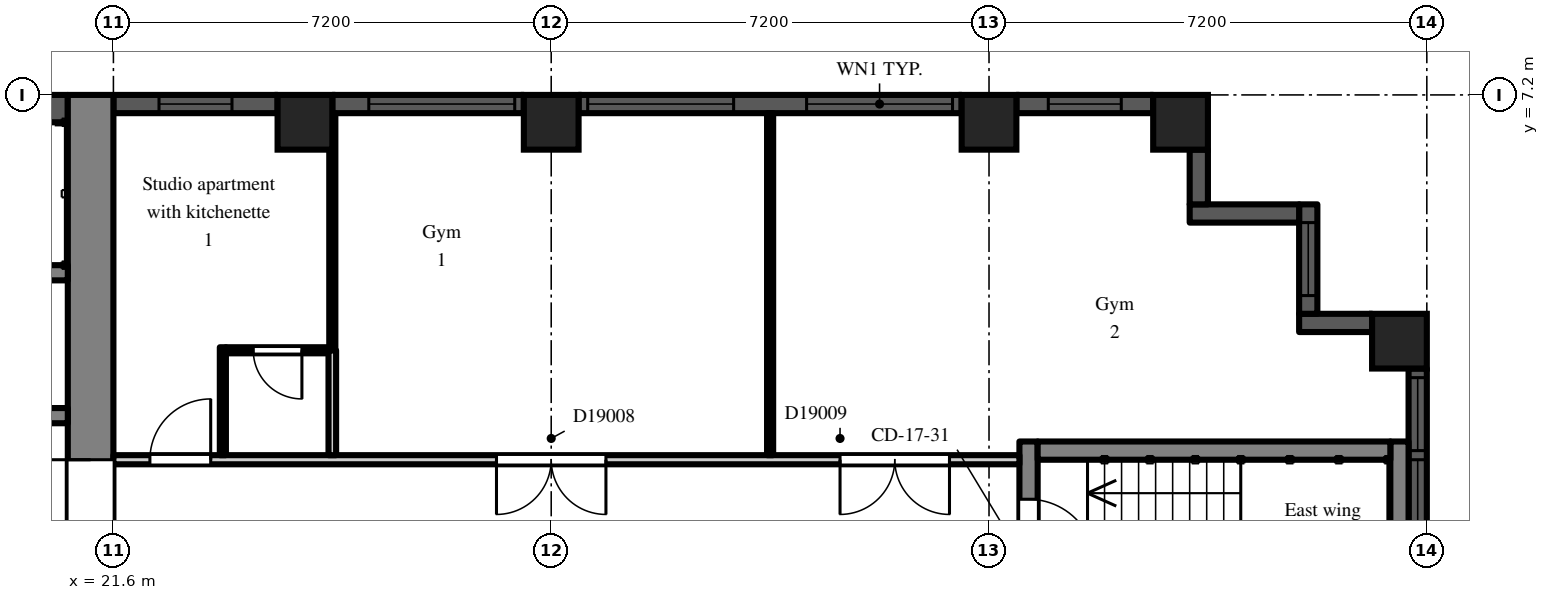
"""IFC4 building model, lengths in metres.
Left out: names, types, materials, properties, quantities, classifications, styles, units other than length and angle.
Written with IfcOpenShell. Run it as: python <this file> out.ifc"""

import sys

from ifc_helpers import new_model, si_unit, direction, frame, frame_2d, origin, origin_2d, place, context, subcontext, project, spatial, rectangle, extrude, element, fill, save


model = new_model("IFC4")
c1 = context("Model", 3, precision=1e-05, world=origin(), true_north=direction((0.0, 1.0)))
c2 = subcontext(c1, "Body", "Model", "MODEL_VIEW")
j1 = project(units=[si_unit("LENGTHUNIT", "METRE"), si_unit("PLANEANGLEUNIT", "RADIAN")], contexts=[c1])
p1 = place(None, origin())
s1 = spatial("IfcSite", under=j1, at=p1, CompositionType="ELEMENT")
p2 = place(p1, origin())
s2 = spatial("IfcBuilding", under=s1, at=p2, CompositionType="ELEMENT")
p3 = place(p2, frame((0.0, 0.0, 129.3)))
s3 = spatial("IfcBuildingStorey", under=s2, at=p3, CompositionType="ELEMENT", Elevation=129.3)
for number, where, z_axis, x_axis in (
    (1, (24.75, 6.75, 0.0), (0.0, 0.0, 1.0), (1.0, 0.0, 0.0)),
    (2, (28.8, 6.75, 0.0), (0.0, 0.0, 1.0), (1.0, 0.0, 0.0)),
    (3, (36.0, 6.75, 0.0), (0.0, 0.0, 1.0), (1.0, 0.0, 0.0)),
    (4, (39.15, 6.75, 0.0), (0.0, 0.0, 1.0), (1.0, 0.0, 0.0)),
    (5, (42.75, 3.15, 0.0), (0.0, 0.0, 1.0), (1.0, 0.0, 0.0)),
):
    element("IfcColumn", number, at=place(p3, frame(where, z_axis=z_axis, x_axis=x_axis)), inside=s3, PredefinedType="COLUMN", context=c2, shape_type="SweptSolid", body=[
        extrude(rectangle(XDim=0.9, YDim=0.9, at=origin_2d()), origin(), (0.0, 0.0, 1.0), 3.0),
    ])
p4 = place(p3, frame((43.05, -2.7, 0.0), z_axis=(0.0, 0.0, 1.0), x_axis=(0.0, 1.0, 0.0)))
e6 = element("IfcWall", 6, at=p4, inside=s3, PredefinedType="SOLIDWALL", context=c2, shape_type="SweptSolid", body=[
    extrude(rectangle(XDim=5.4, YDim=0.3, at=frame_2d((2.7, 0.0))), origin(), (0.0, 0.0, 1.0), 2.2),
])
p5 = place(p4, frame((1.5, 0.0, 0.2)))
e7 = element("IfcOpeningElement", 7, at=p5, cuts=e6, PredefinedType="OPENING", context=c2, shape_type="SweptSolid", body=[
    extrude(rectangle(XDim=2.4, YDim=1.85, at=frame_2d((1.2, 0.925))), frame((0.0, 0.16, 0.0), z_axis=(0.0, -1.0, 0.0), x_axis=(1.0, 0.0, 0.0)), (0.0, 0.0, 1.0), 0.32),
])
p6 = place(p4, frame((0.15, 0.0, 0.2)))
e8 = element("IfcOpeningElement", 8, at=p6, cuts=e6, PredefinedType="OPENING", context=c2, shape_type="SweptSolid", body=[
    extrude(rectangle(XDim=1.2, YDim=1.85, at=frame_2d((0.6, 0.925))), frame((0.0, 0.16, 0.0), z_axis=(0.0, -1.0, 0.0), x_axis=(1.0, 0.0, 0.0)), (0.0, 0.0, 1.0), 0.32),
])
p7 = place(p4, frame((4.05, 0.0, 0.2)))
e9 = element("IfcOpeningElement", 9, at=p7, cuts=e6, PredefinedType="OPENING", context=c2, shape_type="SweptSolid", body=[
    extrude(rectangle(XDim=1.2, YDim=1.85, at=frame_2d((0.6, 0.925))), frame((0.0, 0.16, 0.0), z_axis=(0.0, -1.0, 0.0), x_axis=(1.0, 0.0, 0.0)), (0.0, 0.0, 1.0), 0.32),
])
p8 = place(p3, frame((42.3, 3.45, 0.0), z_axis=(0.0, 0.0, 1.0), x_axis=(-1.0, 0.0, 0.0)))
e10 = element("IfcWall", 10, at=p8, inside=s3, PredefinedType="SOLIDWALL", context=c2, shape_type="SweptSolid", body=[
    extrude(rectangle(XDim=1.2, YDim=0.3, at=frame_2d((0.6, 0.0))), origin(), (0.0, 0.0, 1.0), 2.6),
])
p9 = place(p3, frame((41.25, 3.6, 0.0), z_axis=(0.0, 0.0, 1.0), x_axis=(0.0, 1.0, 0.0)))
e11 = element("IfcWall", 11, at=p9, inside=s3, PredefinedType="SOLIDWALL", context=c2, shape_type="SweptSolid", body=[
    extrude(rectangle(XDim=1.8, YDim=0.3, at=frame_2d((0.9, 0.0))), origin(), (0.0, 0.0, 1.0), 2.6),
])
p10 = place(p9, frame((0.3, 0.0, 0.2)))
e12 = element("IfcOpeningElement", 12, at=p10, cuts=e11, PredefinedType="OPENING", context=c2, shape_type="SweptSolid", body=[
    extrude(rectangle(XDim=1.2, YDim=1.85, at=frame_2d((0.6, 0.925))), frame((0.0, 0.16, 0.0), z_axis=(0.0, -1.0, 0.0), x_axis=(1.0, 0.0, 0.0)), (0.0, 0.0, 1.0), 0.32),
])
p11 = place(p3, frame((41.1, 5.25, 0.0), z_axis=(0.0, 0.0, 1.0), x_axis=(-1.0, 0.0, 0.0)))
e13 = element("IfcWall", 13, at=p11, inside=s3, PredefinedType="SOLIDWALL", context=c2, shape_type="SweptSolid", body=[
    extrude(rectangle(XDim=1.8, YDim=0.3, at=frame_2d((0.9, 0.0))), origin(), (0.0, 0.0, 1.0), 2.6),
])
p12 = place(p3, frame((39.45, 5.4, 0.0), z_axis=(0.0, 0.0, 1.0), x_axis=(0.0, 1.0, 0.0)))
e14 = element("IfcWall", 14, at=p12, inside=s3, PredefinedType="SOLIDWALL", context=c2, shape_type="SweptSolid", body=[
    extrude(rectangle(XDim=0.9, YDim=0.3, at=frame_2d((0.45, 0.0))), origin(), (0.0, 0.0, 1.0), 2.6),
])
p13 = place(p3, frame((38.7, 7.05, 0.0), z_axis=(0.0, 0.0, 1.0), x_axis=(-1.0, 0.0, 0.0)))
e15 = element("IfcWall", 15, at=p13, inside=s3, PredefinedType="SOLIDWALL", context=c2, shape_type="SweptSolid", body=[
    extrude(rectangle(XDim=2.25, YDim=0.3, at=frame_2d((1.125, 0.0))), origin(), (0.0, 0.0, 1.0), 2.2),
])
p14 = place(p13, frame((0.525, 0.0, 0.2)))
e16 = element("IfcOpeningElement", 16, at=p14, cuts=e15, PredefinedType="OPENING", context=c2, shape_type="SweptSolid", body=[
    extrude(rectangle(XDim=1.2, YDim=1.85, at=frame_2d((0.6, 0.925))), frame((0.0, 0.16, 0.0), z_axis=(0.0, -1.0, 0.0), x_axis=(1.0, 0.0, 0.0)), (0.0, 0.0, 1.0), 0.32),
])
p15 = place(p3, frame((35.55, 7.05, 0.0), z_axis=(0.0, 0.0, 1.0), x_axis=(-1.0, 0.0, 0.0)))
e17 = element("IfcWall", 17, at=p15, inside=s3, PredefinedType="SOLIDWALL", context=c2, shape_type="SweptSolid", body=[
    extrude(rectangle(XDim=6.3, YDim=0.3, at=frame_2d((3.15, 0.0))), origin(), (0.0, 0.0, 1.0), 2.2),
])
p16 = place(p15, frame((0.15, 0.0, 0.2)))
e18 = element("IfcOpeningElement", 18, at=p16, cuts=e17, PredefinedType="OPENING", context=c2, shape_type="SweptSolid", body=[
    extrude(rectangle(XDim=2.4, YDim=1.85, at=frame_2d((1.2, 0.925))), frame((0.0, 0.16, 0.0), z_axis=(0.0, -1.0, 0.0), x_axis=(1.0, 0.0, 0.0)), (0.0, 0.0, 1.0), 0.32),
])
p17 = place(p15, frame((3.75, 0.0, 0.2)))
e19 = element("IfcOpeningElement", 19, at=p17, cuts=e17, PredefinedType="OPENING", context=c2, shape_type="SweptSolid", body=[
    extrude(rectangle(XDim=2.4, YDim=1.85, at=frame_2d((1.2, 0.925))), frame((0.0, 0.16, 0.0), z_axis=(0.0, -1.0, 0.0), x_axis=(1.0, 0.0, 0.0)), (0.0, 0.0, 1.0), 0.32),
])
p18 = place(p3, frame((28.35, 7.05, 0.0), z_axis=(0.0, 0.0, 1.0), x_axis=(-1.0, 0.0, 0.0)))
e20 = element("IfcWall", 20, at=p18, inside=s3, PredefinedType="SOLIDWALL", context=c2, shape_type="SweptSolid", body=[
    extrude(rectangle(XDim=3.15, YDim=0.3, at=frame_2d((1.575, 0.0))), origin(), (0.0, 0.0, 1.0), 2.2),
])
p19 = place(p18, frame((0.15, 0.0, 0.2)))
e21 = element("IfcOpeningElement", 21, at=p19, cuts=e20, PredefinedType="OPENING", context=c2, shape_type="SweptSolid", body=[
    extrude(rectangle(XDim=2.4, YDim=1.85, at=frame_2d((1.2, 0.925))), frame((0.0, 0.16, 0.0), z_axis=(0.0, -1.0, 0.0), x_axis=(1.0, 0.0, 0.0)), (0.0, 0.0, 1.0), 0.32),
])
p20 = place(p3, frame((24.3, 7.05, 0.0), z_axis=(0.0, 0.0, 1.0), x_axis=(-1.0, 0.0, 0.0)))
e22 = element("IfcWall", 22, at=p20, inside=s3, PredefinedType="SOLIDWALL", context=c2, shape_type="SweptSolid", body=[
    extrude(rectangle(XDim=2.7, YDim=0.3, at=frame_2d((1.35, 0.0))), origin(), (0.0, 0.0, 1.0), 2.2),
])
p21 = place(p20, frame((0.75, 0.0, 0.2)))
e23 = element("IfcOpeningElement", 23, at=p21, cuts=e22, PredefinedType="OPENING", context=c2, shape_type="SweptSolid", body=[
    extrude(rectangle(XDim=1.2, YDim=1.85, at=frame_2d((0.6, 0.925))), frame((0.0, 0.16, 0.0), z_axis=(0.0, -1.0, 0.0), x_axis=(1.0, 0.0, 0.0)), (0.0, 0.0, 1.0), 0.32),
])
p22 = place(p3, frame((21.225, -7.2, 0.0), z_axis=(0.0, 0.0, 1.0), x_axis=(0.0, 1.0, 0.0)))
e24 = element("IfcWall", 24, at=p22, inside=s3, PredefinedType="SHEAR", context=c2, shape_type="SweptSolid", body=[
    extrude(rectangle(XDim=14.4, YDim=0.75, at=frame_2d((7.2, 0.0))), origin(), (0.0, 0.0, 1.0), 2.6),
])
p23 = place(p22, frame((6.0, 0.0, 0.0)))
e25 = element("IfcOpeningElement", 25, at=p23, cuts=e24, PredefinedType="OPENING", context=c2, shape_type="SweptSolid", body=[
    extrude(rectangle(XDim=2.4, YDim=2.2, at=frame_2d((1.2, 1.1))), frame((0.0, 0.385, 0.0), z_axis=(0.0, -1.0, 0.0), x_axis=(1.0, 0.0, 0.0)), (0.0, 0.0, 1.0), 0.77),
])
p24 = place(p3, frame((7.9, 6.975, 0.0), z_axis=(0.0, 0.0, 1.0), x_axis=(1.0, 0.0, 0.0)))
e26 = element("IfcWall", 26, at=p24, inside=s3, PredefinedType="SHEAR", context=c2, shape_type="SweptSolid", body=[
    extrude(rectangle(XDim=12.95, YDim=0.45, at=frame_2d((6.475, 0.0))), origin(), (0.0, 0.0, 1.0), 2.6),
])
p25 = place(p3, frame((7.9, 1.925, 0.0), z_axis=(0.0, 0.0, 1.0), x_axis=(1.0, 0.0, 0.0)))
e27 = element("IfcWall", 27, at=p25, inside=s3, PredefinedType="SHEAR", context=c2, shape_type="SweptSolid", body=[
    extrude(rectangle(XDim=12.95, YDim=0.25, at=frame_2d((6.475, 0.0))), origin(), (0.0, 0.0, 1.0), 2.6),
])
p26 = place(p25, frame((4.825, 0.0, 0.0)))
e28 = element("IfcOpeningElement", 28, at=p26, cuts=e27, PredefinedType="OPENING", context=c2, shape_type="SweptSolid", body=[
    extrude(rectangle(XDim=1.1, YDim=2.1, at=frame_2d((0.55, 1.05))), frame((0.0, 0.135, 0.0), z_axis=(0.0, -1.0, 0.0), x_axis=(1.0, 0.0, 0.0)), (0.0, 0.0, 1.0), 0.27),
])
p27 = place(p25, frame((7.025, 0.0, 0.0)))
e29 = element("IfcOpeningElement", 29, at=p27, cuts=e27, PredefinedType="OPENING", context=c2, shape_type="SweptSolid", body=[
    extrude(rectangle(XDim=1.1, YDim=2.1, at=frame_2d((0.55, 1.05))), frame((0.0, 0.135, 0.0), z_axis=(0.0, -1.0, 0.0), x_axis=(1.0, 0.0, 0.0)), (0.0, 0.0, 1.0), 0.27),
])
p28 = place(p25, frame((9.225, 0.0, 0.0)))
e30 = element("IfcOpeningElement", 30, at=p28, cuts=e27, PredefinedType="OPENING", context=c2, shape_type="SweptSolid", body=[
    extrude(rectangle(XDim=1.1, YDim=2.1, at=frame_2d((0.55, 1.05))), frame((0.0, 0.135, 0.0), z_axis=(0.0, -1.0, 0.0), x_axis=(1.0, 0.0, 0.0)), (0.0, 0.0, 1.0), 0.27),
])
p29 = place(p25, frame((0.525, 0.0, 0.0)))
e31 = element("IfcOpeningElement", 31, at=p29, cuts=e27, PredefinedType="OPENING", context=c2, shape_type="SweptSolid", body=[
    extrude(rectangle(XDim=0.9, YDim=2.1, at=frame_2d((0.45, 1.05))), frame((0.0, 0.135, 0.0), z_axis=(0.0, -1.0, 0.0), x_axis=(1.0, 0.0, 0.0)), (0.0, 0.0, 1.0), 0.27),
])
p30 = place(p25, frame((2.625, 0.0, 0.0)))
e32 = element("IfcOpeningElement", 32, at=p30, cuts=e27, PredefinedType="OPENING", context=c2, shape_type="SweptSolid", body=[
    extrude(rectangle(XDim=1.1, YDim=2.1, at=frame_2d((0.55, 1.05))), frame((0.0, 0.135, 0.0), z_axis=(0.0, -1.0, 0.0), x_axis=(1.0, 0.0, 0.0)), (0.0, 0.0, 1.0), 0.27),
])
p31 = place(p25, frame((11.525, 0.0, 0.0)))
e33 = element("IfcOpeningElement", 33, at=p31, cuts=e27, PredefinedType="OPENING", context=c2, shape_type="SweptSolid", body=[
    extrude(rectangle(XDim=0.9, YDim=2.1, at=frame_2d((0.45, 1.05))), frame((0.0, 0.135, 0.0), z_axis=(0.0, -1.0, 0.0), x_axis=(1.0, 0.0, 0.0)), (0.0, 0.0, 1.0), 0.27),
])
p32 = place(p3, frame((12.3, 4.275, 0.0), z_axis=(0.0, 0.0, 1.0), x_axis=(1.0, 0.0, 0.0)))
e34 = element("IfcWall", 34, at=p32, inside=s3, PredefinedType="SHEAR", context=c2, shape_type="SweptSolid", body=[
    extrude(rectangle(XDim=8.55, YDim=0.25, at=frame_2d((4.275, 0.0))), origin(), (0.0, 0.0, 1.0), 2.6),
])
p33 = place(p3, frame((36.65, -1.5, 0.0), z_axis=(0.0, 0.0, 1.0), x_axis=(0.0, 1.0, 0.0)))
e35 = element("IfcWall", 35, at=p33, inside=s3, PredefinedType="SHEAR", context=c2, shape_type="SweptSolid", body=[
    extrude(rectangle(XDim=3.0, YDim=0.3, at=frame_2d((1.5, 0.0))), origin(), (0.0, 0.0, 1.0), 2.6),
])
p34 = place(p33, frame((0.95, 0.0, 0.0)))
e36 = element("IfcOpeningElement", 36, at=p34, cuts=e35, PredefinedType="OPENING", context=c2, shape_type="SweptSolid", body=[
    extrude(rectangle(XDim=1.1, YDim=2.1, at=frame_2d((0.55, 1.05))), frame((0.0, 0.16, 0.0), z_axis=(0.0, -1.0, 0.0), x_axis=(1.0, 0.0, 0.0)), (0.0, 0.0, 1.0), 0.32),
])
p35 = place(p3, frame((42.75, -1.5, 0.0), z_axis=(0.0, 0.0, 1.0), x_axis=(0.0, 1.0, 0.0)))
e37 = element("IfcWall", 37, at=p35, inside=s3, PredefinedType="SHEAR", context=c2, shape_type="SweptSolid", body=[
    extrude(rectangle(XDim=3.0, YDim=0.3, at=frame_2d((1.5, 0.0))), origin(), (0.0, 0.0, 1.0), 2.6),
])
p36 = place(p3, frame((36.8, 1.35, 0.0), z_axis=(0.0, 0.0, 1.0), x_axis=(1.0, 0.0, 0.0)))
e38 = element("IfcWall", 38, at=p36, inside=s3, PredefinedType="SHEAR", context=c2, shape_type="SweptSolid", body=[
    extrude(rectangle(XDim=5.8, YDim=0.3, at=frame_2d((2.9, 0.0))), origin(), (0.0, 0.0, 1.0), 2.6),
])
p37 = place(p3, frame((21.6, 1.2, 0.0), z_axis=(0.0, 0.0, 1.0), x_axis=(1.0, 0.0, 0.0)))
e39 = element("IfcWall", 39, at=p37, inside=s3, PredefinedType="PARTITIONING", context=c2, shape_type="SweptSolid", body=[
    extrude(rectangle(XDim=14.9, YDim=0.15, at=frame_2d((7.45, 0.0))), origin(), (0.0, 0.0, 1.0), 2.6),
])
p38 = place(p37, frame((0.6, 0.0, 0.0)))
e40 = element("IfcOpeningElement", 40, at=p38, cuts=e39, PredefinedType="OPENING", context=c2, shape_type="SweptSolid", body=[
    extrude(rectangle(XDim=1.0, YDim=2.1, at=frame_2d((0.5, 1.05))), frame((0.0, 0.085, 0.0), z_axis=(0.0, -1.0, 0.0), x_axis=(1.0, 0.0, 0.0)), (0.0, 0.0, 1.0), 0.17),
])
p39 = place(p37, frame((6.3, 0.0, 0.0)))
e41 = element("IfcOpeningElement", 41, at=p39, cuts=e39, PredefinedType="OPENING", context=c2, shape_type="SweptSolid", body=[
    extrude(rectangle(XDim=1.8, YDim=2.1, at=frame_2d((0.9, 1.05))), frame((0.0, 0.085, 0.0), z_axis=(0.0, -1.0, 0.0), x_axis=(1.0, 0.0, 0.0)), (0.0, 0.0, 1.0), 0.17),
])
p40 = place(p37, frame((11.95, 0.0, 0.0)))
e42 = element("IfcOpeningElement", 42, at=p40, cuts=e39, PredefinedType="OPENING", context=c2, shape_type="SweptSolid", body=[
    extrude(rectangle(XDim=1.8, YDim=2.1, at=frame_2d((0.9, 1.05))), frame((0.0, 0.085, 0.0), z_axis=(0.0, -1.0, 0.0), x_axis=(1.0, 0.0, 0.0)), (0.0, 0.0, 1.0), 0.17),
])
p41 = place(p3, frame((23.4, 1.275, 0.0), z_axis=(0.0, 0.0, 1.0), x_axis=(0.0, 1.0, 0.0)))
e43 = element("IfcWall", 43, at=p41, inside=s3, PredefinedType="PARTITIONING", context=c2, shape_type="SweptSolid", body=[
    extrude(rectangle(XDim=1.775, YDim=0.1, at=frame_2d((0.888, 0.0))), origin(), (0.0, 0.0, 1.0), 2.6),
])
p42 = place(p3, frame((23.45, 3.0, 0.0), z_axis=(0.0, 0.0, 1.0), x_axis=(1.0, 0.0, 0.0)))
e44 = element("IfcWall", 44, at=p42, inside=s3, PredefinedType="PARTITIONING", context=c2, shape_type="SweptSolid", body=[
    extrude(rectangle(XDim=1.688, YDim=0.1, at=frame_2d((0.844, 0.0))), origin(), (0.0, 0.0, 1.0), 2.6),
])
p43 = place(p42, frame((0.45, 0.0, 0.0)))
e45 = element("IfcOpeningElement", 45, at=p43, cuts=e44, PredefinedType="OPENING", context=c2, shape_type="SweptSolid", body=[
    extrude(rectangle(XDim=0.8, YDim=2.1, at=frame_2d((0.4, 1.05))), frame((0.0, 0.06, 0.0), z_axis=(0.0, -1.0, 0.0), x_axis=(1.0, 0.0, 0.0)), (0.0, 0.0, 1.0), 0.12),
])
p44 = place(p3, frame((25.2, 1.275, 0.0), z_axis=(0.0, 0.0, 1.0), x_axis=(0.0, 1.0, 0.0)))
e46 = element("IfcWall", 46, at=p44, inside=s3, PredefinedType="PARTITIONING", context=c2, shape_type="SweptSolid", body=[
    extrude(rectangle(XDim=1.725, YDim=0.125, at=frame_2d((0.863, 0.0))), origin(), (0.0, 0.0, 1.0), 2.6),
])
p45 = place(p3, frame((25.2, 3.0, 0.0), z_axis=(0.0, 0.0, 1.0), x_axis=(0.0, 1.0, 0.0)))
e47 = element("IfcWall", 47, at=p45, inside=s3, PredefinedType="PARTITIONING", context=c2, shape_type="SweptSolid", body=[
    extrude(rectangle(XDim=3.9, YDim=0.1, at=frame_2d((1.95, 0.0))), origin(), (0.0, 0.0, 1.0), 2.6),
])
p46 = place(p3, frame((32.4, 1.275, 0.0), z_axis=(0.0, 0.0, 1.0), x_axis=(0.0, 1.0, 0.0)))
e48 = element("IfcWall", 48, at=p46, inside=s3, PredefinedType="PARTITIONING", context=c2, shape_type="SweptSolid", body=[
    extrude(rectangle(XDim=5.625, YDim=0.1, at=frame_2d((2.812, 0.0))), origin(), (0.0, 0.0, 1.0), 2.6),
])
p47 = place(p5, origin())
e49 = element("IfcWindow", 49, at=p47, inside=s3, PartitioningType="SINGLE_PANEL", PredefinedType="WINDOW", context=c2, shape_type="SweptSolid", body=[
    extrude(rectangle(XDim=2.4, YDim=1.85, at=frame_2d((1.2, 0.925))), frame((0.0, 0.03, 0.0), z_axis=(0.0, -1.0, 0.0), x_axis=(1.0, 0.0, 0.0)), (0.0, 0.0, 1.0), 0.06),
])
fill(e7, e49)
p48 = place(p7, origin())
e50 = element("IfcWindow", 50, at=p48, inside=s3, PartitioningType="SINGLE_PANEL", PredefinedType="WINDOW", context=c2, shape_type="SweptSolid", body=[
    extrude(rectangle(XDim=1.2, YDim=1.85, at=frame_2d((0.6, 0.925))), frame((0.0, 0.03, 0.0), z_axis=(0.0, -1.0, 0.0), x_axis=(1.0, 0.0, 0.0)), (0.0, 0.0, 1.0), 0.06),
])
fill(e9, e50)
p49 = place(p10, origin())
e51 = element("IfcWindow", 51, at=p49, inside=s3, PartitioningType="SINGLE_PANEL", PredefinedType="WINDOW", context=c2, shape_type="SweptSolid", body=[
    extrude(rectangle(XDim=1.2, YDim=1.85, at=frame_2d((0.6, 0.925))), frame((0.0, 0.03, 0.0), z_axis=(0.0, -1.0, 0.0), x_axis=(1.0, 0.0, 0.0)), (0.0, 0.0, 1.0), 0.06),
])
fill(e12, e51)
p50 = place(p14, origin())
e52 = element("IfcWindow", 52, at=p50, inside=s3, PartitioningType="SINGLE_PANEL", PredefinedType="WINDOW", context=c2, shape_type="SweptSolid", body=[
    extrude(rectangle(XDim=1.2, YDim=1.85, at=frame_2d((0.6, 0.925))), frame((0.0, 0.03, 0.0), z_axis=(0.0, -1.0, 0.0), x_axis=(1.0, 0.0, 0.0)), (0.0, 0.0, 1.0), 0.06),
])
fill(e16, e52)
p51 = place(p16, origin())
e53 = element("IfcWindow", 53, at=p51, inside=s3, PartitioningType="SINGLE_PANEL", PredefinedType="WINDOW", context=c2, shape_type="SweptSolid", body=[
    extrude(rectangle(XDim=2.4, YDim=1.85, at=frame_2d((1.2, 0.925))), frame((0.0, 0.03, 0.0), z_axis=(0.0, -1.0, 0.0), x_axis=(1.0, 0.0, 0.0)), (0.0, 0.0, 1.0), 0.06),
])
fill(e18, e53)
p52 = place(p17, origin())
e54 = element("IfcWindow", 54, at=p52, inside=s3, PartitioningType="SINGLE_PANEL", PredefinedType="WINDOW", context=c2, shape_type="SweptSolid", body=[
    extrude(rectangle(XDim=2.4, YDim=1.85, at=frame_2d((1.2, 0.925))), frame((0.0, 0.03, 0.0), z_axis=(0.0, -1.0, 0.0), x_axis=(1.0, 0.0, 0.0)), (0.0, 0.0, 1.0), 0.06),
])
fill(e19, e54)
p53 = place(p19, origin())
e55 = element("IfcWindow", 55, at=p53, inside=s3, PartitioningType="SINGLE_PANEL", PredefinedType="WINDOW", context=c2, shape_type="SweptSolid", body=[
    extrude(rectangle(XDim=2.4, YDim=1.85, at=frame_2d((1.2, 0.925))), frame((0.0, 0.03, 0.0), z_axis=(0.0, -1.0, 0.0), x_axis=(1.0, 0.0, 0.0)), (0.0, 0.0, 1.0), 0.06),
])
fill(e21, e55)
p54 = place(p21, origin())
e56 = element("IfcWindow", 56, at=p54, inside=s3, PartitioningType="SINGLE_PANEL", PredefinedType="WINDOW", context=c2, shape_type="SweptSolid", body=[
    extrude(rectangle(XDim=1.2, YDim=1.85, at=frame_2d((0.6, 0.925))), frame((0.0, 0.03, 0.0), z_axis=(0.0, -1.0, 0.0), x_axis=(1.0, 0.0, 0.0)), (0.0, 0.0, 1.0), 0.06),
])
fill(e23, e56)
p55 = place(p23, origin())
e57 = element("IfcDoor", 57, at=p55, inside=s3, OperationType="DOUBLE_DOOR_DOUBLE_SWING", PredefinedType="DOOR", context=c2, shape_type="SweptSolid", body=[
    extrude(rectangle(XDim=2.4, YDim=2.2, at=frame_2d((1.2, 1.1))), frame((0.0, 0.025, 0.0), z_axis=(0.0, -1.0, 0.0), x_axis=(1.0, 0.0, 0.0)), (0.0, 0.0, 1.0), 0.05),
])
fill(e25, e57)
p56 = place(p34, frame((1.1, 0.0, 0.0), z_axis=(0.0, 0.0, 1.0), x_axis=(-1.0, 0.0, 0.0)))
e58 = element("IfcDoor", 58, at=p56, inside=s3, OperationType="SINGLE_SWING_RIGHT", PredefinedType="DOOR", context=c2, shape_type="SweptSolid", body=[
    extrude(rectangle(XDim=1.1, YDim=2.1, at=frame_2d((0.55, 1.05))), frame((0.0, 0.025, 0.0), z_axis=(0.0, -1.0, 0.0), x_axis=(1.0, 0.0, 0.0)), (0.0, 0.0, 1.0), 0.05),
])
fill(e36, e58)
p57 = place(p43, frame((0.8, 0.0, 0.0), z_axis=(0.0, 0.0, 1.0), x_axis=(-1.0, 0.0, 0.0)))
e59 = element("IfcDoor", 59, at=p57, inside=s3, OperationType="SINGLE_SWING_LEFT", PredefinedType="DOOR", context=c2, shape_type="SweptSolid", body=[
    extrude(rectangle(XDim=0.8, YDim=2.1, at=frame_2d((0.4, 1.05))), frame((0.0, 0.025, 0.0), z_axis=(0.0, -1.0, 0.0), x_axis=(1.0, 0.0, 0.0)), (0.0, 0.0, 1.0), 0.05),
])
fill(e45, e59)
p58 = place(p38, origin())
e60 = element("IfcDoor", 60, at=p58, inside=s3, OperationType="SINGLE_SWING_RIGHT", PredefinedType="DOOR", context=c2, shape_type="SweptSolid", body=[
    extrude(rectangle(XDim=1.0, YDim=2.1, at=frame_2d((0.5, 1.05))), frame((0.0, 0.025, 0.0), z_axis=(0.0, -1.0, 0.0), x_axis=(1.0, 0.0, 0.0)), (0.0, 0.0, 1.0), 0.05),
])
fill(e40, e60)
p59 = place(p39, frame((1.8, 0.0, 0.0), z_axis=(0.0, 0.0, 1.0), x_axis=(-1.0, 0.0, 0.0)))
e61 = element("IfcDoor", 61, at=p59, inside=s3, OperationType="DOUBLE_DOOR_DOUBLE_SWING", PredefinedType="DOOR", context=c2, shape_type="SweptSolid", body=[
    extrude(rectangle(XDim=1.8, YDim=2.1, at=frame_2d((0.9, 1.05))), frame((0.0, 0.025, 0.0), z_axis=(0.0, -1.0, 0.0), x_axis=(1.0, 0.0, 0.0)), (0.0, 0.0, 1.0), 0.05),
])
fill(e41, e61)
p60 = place(p40, frame((1.8, 0.0, 0.0), z_axis=(0.0, 0.0, 1.0), x_axis=(-1.0, 0.0, 0.0)))
e62 = element("IfcDoor", 62, at=p60, inside=s3, OperationType="DOUBLE_DOOR_DOUBLE_SWING", PredefinedType="DOOR", context=c2, shape_type="SweptSolid", body=[
    extrude(rectangle(XDim=1.8, YDim=2.1, at=frame_2d((0.9, 1.05))), frame((0.0, 0.025, 0.0), z_axis=(0.0, -1.0, 0.0), x_axis=(1.0, 0.0, 0.0)), (0.0, 0.0, 1.0), 0.05),
])
fill(e42, e62)
save(model, sys.argv[1])
